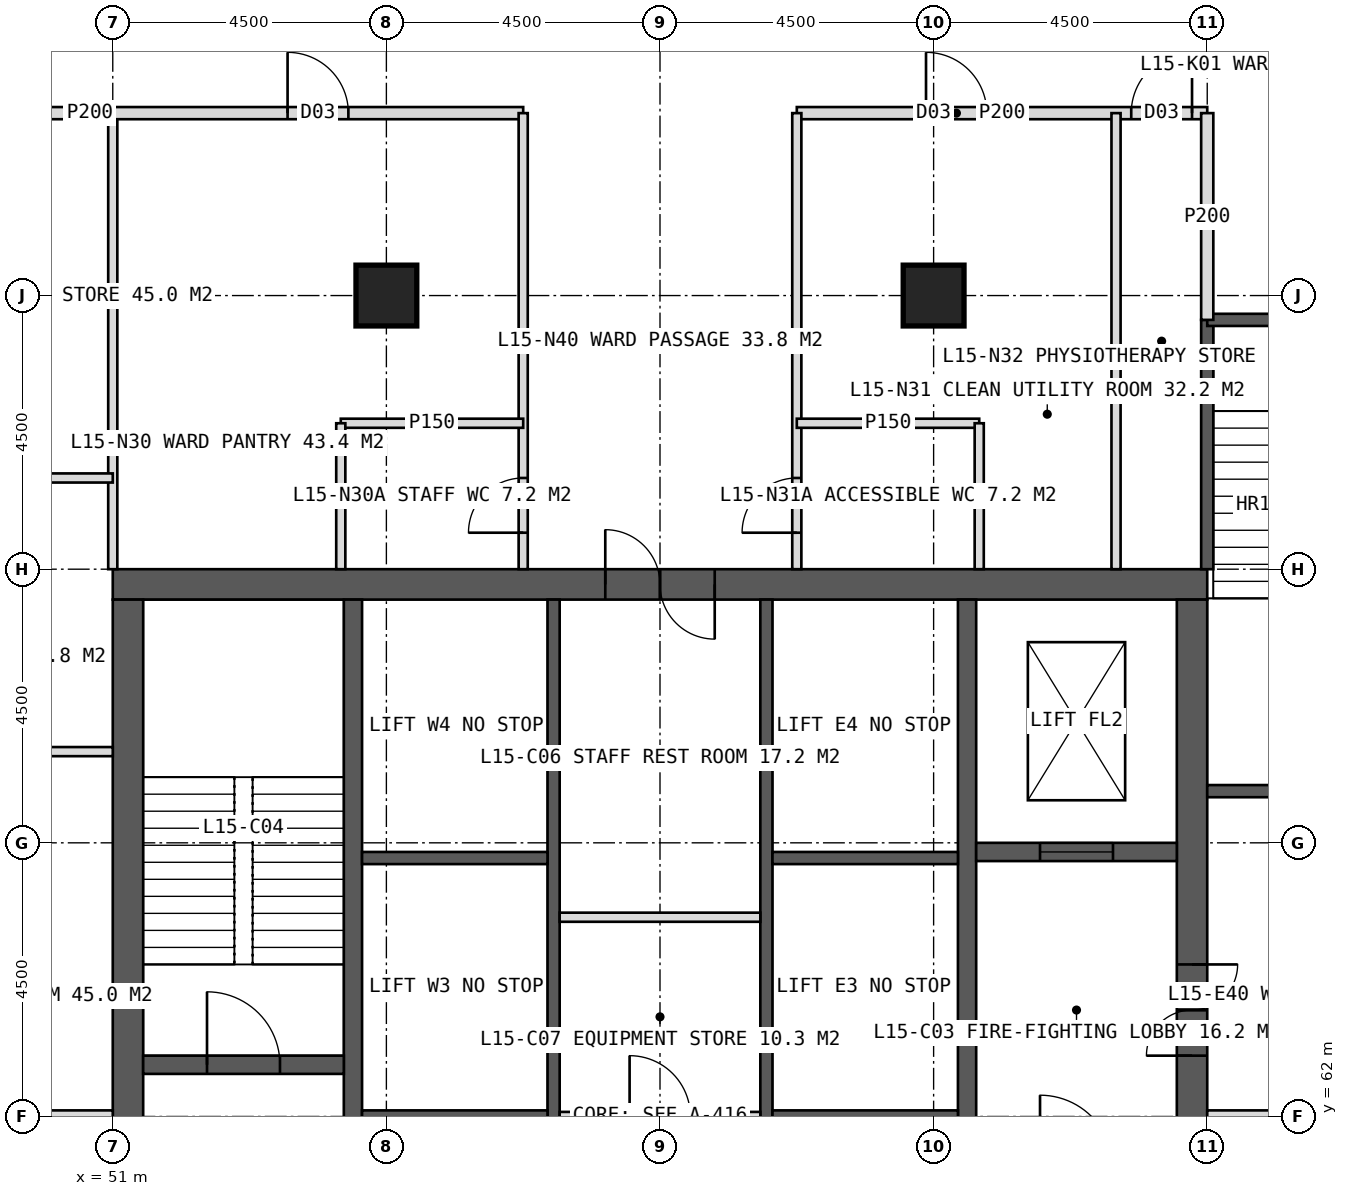
"""IFC4 building model, lengths in metres.
Left out: names, types, materials, properties, quantities, classifications, styles, units other than length and angle.
Written with IfcOpenShell. Run it as: python <this file> out.ifc"""

import sys

from ifc_helpers import new_model, si_unit, direction, frame, frame_2d, origin, origin_2d, place, context, subcontext, project, spatial, rectangle, hollow_rectangle, extrude, element, fill, save


model = new_model("IFC4")
c1 = context("Model", 3, precision=1e-05, world=origin(), true_north=direction((0.0, 1.0)))
c2 = subcontext(c1, "Body", "Model", "MODEL_VIEW")
j1 = project(units=[si_unit("LENGTHUNIT", "METRE"), si_unit("PLANEANGLEUNIT", "RADIAN")], contexts=[c1])
p1 = place(None, origin())
s1 = spatial("IfcSite", under=j1, at=p1, CompositionType="ELEMENT")
p2 = place(p1, origin())
s2 = spatial("IfcBuilding", under=s1, at=p2, CompositionType="ELEMENT")
p3 = place(p2, frame((0.0, 0.0, 67.0)))
s3 = spatial("IfcBuildingStorey", under=s2, at=p3, CompositionType="ELEMENT", Elevation=67.0)
p4 = place(p3, frame((51.0, 70.75, 0.0), z_axis=(0.0, 0.0, 1.0), x_axis=(1.0, 0.0, 0.0)))
e1 = element("IfcWall", 1, at=p4, inside=s3, PredefinedType="SHEAR", context=c2, shape_type="SweptSolid", body=[
    extrude(rectangle(XDim=18.0, YDim=0.5, at=frame_2d((9.0, 0.0))), origin(), (0.0, 0.0, 1.0), 4.0),
])
p5 = place(p4, frame((8.1, 0.0, 0.0)))
e2 = element("IfcOpeningElement", 2, at=p5, cuts=e1, PredefinedType="OPENING", context=c2, shape_type="SweptSolid", body=[
    extrude(rectangle(XDim=1.8, YDim=2.2, at=frame_2d((0.9, 1.1))), frame((0.0, 0.26, 0.0), z_axis=(0.0, -1.0, 0.0), x_axis=(1.0, 0.0, 0.0)), (0.0, 0.0, 1.0), 0.52),
])
p6 = place(p3, frame((51.25, 53.5, 0.0), z_axis=(0.0, 0.0, 1.0), x_axis=(0.0, 1.0, 0.0)))
e3 = element("IfcWall", 3, at=p6, inside=s3, PredefinedType="SHEAR", context=c2, shape_type="SweptSolid", body=[
    extrude(rectangle(XDim=17.0, YDim=0.5, at=frame_2d((8.5, 0.0))), origin(), (0.0, 0.0, 1.0), 4.0),
])
p7 = place(p6, frame((6.0, 0.0, 0.0)))
e4 = element("IfcOpeningElement", 4, at=p7, cuts=e3, PredefinedType="OPENING", context=c2, shape_type="SweptSolid", body=[
    extrude(rectangle(XDim=1.5, YDim=2.2, at=frame_2d((0.75, 1.1))), frame((0.0, 0.26, 0.0), z_axis=(0.0, -1.0, 0.0), x_axis=(1.0, 0.0, 0.0)), (0.0, 0.0, 1.0), 0.52),
])
p8 = place(p3, frame((68.75, 53.5, 0.0), z_axis=(0.0, 0.0, 1.0), x_axis=(0.0, 1.0, 0.0)))
e5 = element("IfcWall", 5, at=p8, inside=s3, PredefinedType="SHEAR", context=c2, shape_type="SweptSolid", body=[
    extrude(rectangle(XDim=17.0, YDim=0.5, at=frame_2d((8.5, 0.0))), origin(), (0.0, 0.0, 1.0), 4.0),
])
p9 = place(p8, frame((9.5, 0.0, 0.0)))
e6 = element("IfcOpeningElement", 6, at=p9, cuts=e5, PredefinedType="OPENING", context=c2, shape_type="SweptSolid", body=[
    extrude(rectangle(XDim=1.5, YDim=2.2, at=frame_2d((0.75, 1.1))), frame((0.0, 0.26, 0.0), z_axis=(0.0, -1.0, 0.0), x_axis=(1.0, 0.0, 0.0)), (0.0, 0.0, 1.0), 0.52),
])
for number, where, z_axis, x_axis in (
    (7, (54.95, 53.5, 0.0), (0.0, 0.0, 1.0), (0.0, 1.0, 0.0)),
    (8, (65.05, 53.5, 0.0), (0.0, 0.0, 1.0), (0.0, 1.0, 0.0)),
):
    element("IfcWall", number, at=place(p3, frame(where, z_axis=z_axis, x_axis=x_axis)), inside=s3, PredefinedType="SHEAR", context=c2, shape_type="SweptSolid", body=[
        extrude(rectangle(XDim=17.0, YDim=0.3, at=frame_2d((8.5, 0.0))), origin(), (0.0, 0.0, 1.0), 4.0),
    ])
p10 = place(p3, frame((58.25, 53.5, 0.0), z_axis=(0.0, 0.0, 1.0), x_axis=(0.0, 1.0, 0.0)))
e9 = element("IfcWall", 9, at=p10, inside=s3, PredefinedType="SHEAR", context=c2, shape_type="SweptSolid", body=[
    extrude(rectangle(XDim=17.0, YDim=0.2, at=frame_2d((8.5, 0.0))), origin(), (0.0, 0.0, 1.0), 4.0),
])
p11 = place(p10, frame((1.375, 0.0, 0.0)))
e10 = element("IfcOpeningElement", 10, at=p11, cuts=e9, PredefinedType="OPENING", context=c2, shape_type="SweptSolid", body=[
    extrude(rectangle(XDim=1.4, YDim=2.2, at=frame_2d((0.7, 1.1))), frame((0.0, 0.11, 0.0), z_axis=(0.0, -1.0, 0.0), x_axis=(1.0, 0.0, 0.0)), (0.0, 0.0, 1.0), 0.22),
])
p12 = place(p10, frame((5.675, 0.0, 0.0)))
e11 = element("IfcOpeningElement", 11, at=p12, cuts=e9, PredefinedType="OPENING", context=c2, shape_type="SweptSolid", body=[
    extrude(rectangle(XDim=1.4, YDim=2.2, at=frame_2d((0.7, 1.1))), frame((0.0, 0.11, 0.0), z_axis=(0.0, -1.0, 0.0), x_axis=(1.0, 0.0, 0.0)), (0.0, 0.0, 1.0), 0.22),
])
p13 = place(p3, frame((61.75, 53.5, 0.0), z_axis=(0.0, 0.0, 1.0), x_axis=(0.0, 1.0, 0.0)))
e12 = element("IfcWall", 12, at=p13, inside=s3, PredefinedType="SHEAR", context=c2, shape_type="SweptSolid", body=[
    extrude(rectangle(XDim=17.0, YDim=0.2, at=frame_2d((8.5, 0.0))), origin(), (0.0, 0.0, 1.0), 4.0),
])
p14 = place(p13, frame((1.375, 0.0, 0.0)))
e13 = element("IfcOpeningElement", 13, at=p14, cuts=e12, PredefinedType="OPENING", context=c2, shape_type="SweptSolid", body=[
    extrude(rectangle(XDim=1.4, YDim=2.2, at=frame_2d((0.7, 1.1))), frame((0.0, 0.11, 0.0), z_axis=(0.0, -1.0, 0.0), x_axis=(1.0, 0.0, 0.0)), (0.0, 0.0, 1.0), 0.22),
])
p15 = place(p13, frame((5.675, 0.0, 0.0)))
e14 = element("IfcOpeningElement", 14, at=p15, cuts=e12, PredefinedType="OPENING", context=c2, shape_type="SweptSolid", body=[
    extrude(rectangle(XDim=1.4, YDim=2.2, at=frame_2d((0.7, 1.1))), frame((0.0, 0.11, 0.0), z_axis=(0.0, -1.0, 0.0), x_axis=(1.0, 0.0, 0.0)), (0.0, 0.0, 1.0), 0.22),
])
for number, where, z_axis, x_axis in (
    (15, (55.1, 62.0, 0.0), (0.0, 0.0, 1.0), (1.0, 0.0, 0.0)),
    (16, (61.85, 62.0, 0.0), (0.0, 0.0, 1.0), (1.0, 0.0, 0.0)),
    (17, (55.1, 66.25, 0.0), (0.0, 0.0, 1.0), (1.0, 0.0, 0.0)),
    (18, (61.85, 66.25, 0.0), (0.0, 0.0, 1.0), (1.0, 0.0, 0.0)),
):
    element("IfcWall", number, at=place(p3, frame(where, z_axis=z_axis, x_axis=x_axis)), inside=s3, PredefinedType="SHEAR", context=c2, shape_type="SweptSolid", body=[
        extrude(rectangle(XDim=3.05, YDim=0.2, at=frame_2d((1.525, 0.0))), origin(), (0.0, 0.0, 1.0), 4.0),
    ])
p16 = place(p3, frame((51.5, 62.85, 0.0), z_axis=(0.0, 0.0, 1.0), x_axis=(1.0, 0.0, 0.0)))
e19 = element("IfcWall", 19, at=p16, inside=s3, PredefinedType="SHEAR", context=c2, shape_type="SweptSolid", body=[
    extrude(rectangle(XDim=3.3, YDim=0.3, at=frame_2d((1.65, 0.0))), origin(), (0.0, 0.0, 1.0), 4.0),
])
p17 = place(p16, frame((1.05, 0.0, 0.0)))
e20 = element("IfcOpeningElement", 20, at=p17, cuts=e19, PredefinedType="OPENING", context=c2, shape_type="SweptSolid", body=[
    extrude(rectangle(XDim=1.2, YDim=2.1, at=frame_2d((0.6, 1.05))), frame((0.0, 0.16, 0.0), z_axis=(0.0, -1.0, 0.0), x_axis=(1.0, 0.0, 0.0)), (0.0, 0.0, 1.0), 0.32),
])
p18 = place(p3, frame((65.2, 66.35, 0.0), z_axis=(0.0, 0.0, 1.0), x_axis=(1.0, 0.0, 0.0)))
e21 = element("IfcWall", 21, at=p18, inside=s3, PredefinedType="SHEAR", context=c2, shape_type="SweptSolid", body=[
    extrude(rectangle(XDim=3.3, YDim=0.3, at=frame_2d((1.65, 0.0))), origin(), (0.0, 0.0, 1.0), 4.0),
])
p19 = place(p18, frame((1.05, 0.0, 0.0)))
e22 = element("IfcOpeningElement", 22, at=p19, cuts=e21, PredefinedType="OPENING", context=c2, shape_type="SweptSolid", body=[
    extrude(rectangle(XDim=1.2, YDim=2.2, at=frame_2d((0.6, 1.1))), frame((0.0, 0.16, 0.0), z_axis=(0.0, -1.0, 0.0), x_axis=(1.0, 0.0, 0.0)), (0.0, 0.0, 1.0), 0.32),
])
for number, where, z_axis, x_axis in (
    (23, (55.5, 75.5, 0.0), (0.0, 0.0, 1.0), (1.0, 0.0, 0.0)),
    (24, (64.5, 75.5, 0.0), (0.0, 0.0, 1.0), (1.0, 0.0, 0.0)),
):
    element("IfcColumn", number, at=place(p3, frame(where, z_axis=z_axis, x_axis=x_axis)), inside=s3, PredefinedType="COLUMN", context=c2, shape_type="SweptSolid", body=[
        extrude(hollow_rectangle(XDim=1.0, YDim=1.0, WallThickness=0.1, at=origin_2d()), origin(), (0.0, 0.0, 1.0), 4.0),
    ])
p20 = place(p3, frame((51.0, 71.0, 0.0), z_axis=(0.0, 0.0, 1.0), x_axis=(0.0, 1.0, 0.0)))
e25 = element("IfcWall", 25, at=p20, inside=s3, PredefinedType="PARTITIONING", context=c2, shape_type="SweptSolid", body=[
    extrude(rectangle(XDim=7.5, YDim=0.15, at=frame_2d((3.75, 0.0))), origin(), (0.0, 0.0, 1.0), 3.75),
])
p21 = place(p3, frame((43.5, 78.5, 0.0), z_axis=(0.0, 0.0, 1.0), x_axis=(1.0, 0.0, 0.0)))
e26 = element("IfcWall", 26, at=p21, inside=s3, PredefinedType="PARTITIONING", context=c2, shape_type="SweptSolid", body=[
    extrude(rectangle(XDim=14.25, YDim=0.2, at=frame_2d((7.125, 0.0))), origin(), (0.0, 0.0, 1.0), 3.75),
])
p22 = place(p21, frame((10.375, 0.0, 0.0)))
e27 = element("IfcOpeningElement", 27, at=p22, cuts=e26, PredefinedType="OPENING", context=c2, shape_type="SweptSolid", body=[
    extrude(rectangle(XDim=1.0, YDim=2.1, at=frame_2d((0.5, 1.05))), frame((0.0, 0.11, 0.0), z_axis=(0.0, -1.0, 0.0), x_axis=(1.0, 0.0, 0.0)), (0.0, 0.0, 1.0), 0.22),
])
p23 = place(p3, frame((62.25, 78.5, 0.0), z_axis=(0.0, 0.0, 1.0), x_axis=(1.0, 0.0, 0.0)))
e28 = element("IfcWall", 28, at=p23, inside=s3, PredefinedType="PARTITIONING", context=c2, shape_type="SweptSolid", body=[
    extrude(rectangle(XDim=6.75, YDim=0.2, at=frame_2d((3.375, 0.0))), origin(), (0.0, 0.0, 1.0), 3.75),
])
p24 = place(p23, frame((2.125, 0.0, 0.0)))
e29 = element("IfcOpeningElement", 29, at=p24, cuts=e28, PredefinedType="OPENING", context=c2, shape_type="SweptSolid", body=[
    extrude(rectangle(XDim=1.0, YDim=2.1, at=frame_2d((0.5, 1.05))), frame((0.0, 0.11, 0.0), z_axis=(0.0, -1.0, 0.0), x_axis=(1.0, 0.0, 0.0)), (0.0, 0.0, 1.0), 0.22),
])
p25 = place(p23, frame((5.5, 0.0, 0.0)))
e30 = element("IfcOpeningElement", 30, at=p25, cuts=e28, PredefinedType="OPENING", context=c2, shape_type="SweptSolid", body=[
    extrude(rectangle(XDim=1.0, YDim=2.1, at=frame_2d((0.5, 1.05))), frame((0.0, 0.11, 0.0), z_axis=(0.0, -1.0, 0.0), x_axis=(1.0, 0.0, 0.0)), (0.0, 0.0, 1.0), 0.22),
])
p26 = place(p3, frame((57.75, 71.0, 0.0), z_axis=(0.0, 0.0, 1.0), x_axis=(0.0, 1.0, 0.0)))
e31 = element("IfcWall", 31, at=p26, inside=s3, PredefinedType="PARTITIONING", context=c2, shape_type="SweptSolid", body=[
    extrude(rectangle(XDim=7.5, YDim=0.15, at=frame_2d((3.75, 0.0))), origin(), (0.0, 0.0, 1.0), 3.75),
])
p27 = place(p26, frame((0.6, 0.0, 0.0)))
e32 = element("IfcOpeningElement", 32, at=p27, cuts=e31, PredefinedType="OPENING", context=c2, shape_type="SweptSolid", body=[
    extrude(rectangle(XDim=0.9, YDim=2.1, at=frame_2d((0.45, 1.05))), frame((0.0, 0.085, 0.0), z_axis=(0.0, -1.0, 0.0), x_axis=(1.0, 0.0, 0.0)), (0.0, 0.0, 1.0), 0.17),
])
p28 = place(p3, frame((62.25, 71.0, 0.0), z_axis=(0.0, 0.0, 1.0), x_axis=(0.0, 1.0, 0.0)))
e33 = element("IfcWall", 33, at=p28, inside=s3, PredefinedType="PARTITIONING", context=c2, shape_type="SweptSolid", body=[
    extrude(rectangle(XDim=7.5, YDim=0.15, at=frame_2d((3.75, 0.0))), origin(), (0.0, 0.0, 1.0), 3.75),
])
p29 = place(p28, frame((0.6, 0.0, 0.0)))
e34 = element("IfcOpeningElement", 34, at=p29, cuts=e33, PredefinedType="OPENING", context=c2, shape_type="SweptSolid", body=[
    extrude(rectangle(XDim=0.9, YDim=2.1, at=frame_2d((0.45, 1.05))), frame((0.0, 0.085, 0.0), z_axis=(0.0, -1.0, 0.0), x_axis=(1.0, 0.0, 0.0)), (0.0, 0.0, 1.0), 0.17),
])
p30 = place(p3, frame((67.5, 71.0, 0.0), z_axis=(0.0, 0.0, 1.0), x_axis=(0.0, 1.0, 0.0)))
e35 = element("IfcWall", 35, at=p30, inside=s3, PredefinedType="PARTITIONING", context=c2, shape_type="SweptSolid", body=[
    extrude(rectangle(XDim=7.5, YDim=0.15, at=frame_2d((3.75, 0.0))), origin(), (0.0, 0.0, 1.0), 3.75),
])
p31 = place(p3, frame((54.75, 73.4, 0.0), z_axis=(0.0, 0.0, 1.0), x_axis=(1.0, 0.0, 0.0)))
e36 = element("IfcWall", 36, at=p31, inside=s3, PredefinedType="PARTITIONING", context=c2, shape_type="SweptSolid", body=[
    extrude(rectangle(XDim=3.0, YDim=0.15, at=frame_2d((1.5, 0.0))), origin(), (0.0, 0.0, 1.0), 3.75),
])
p32 = place(p3, frame((54.75, 71.0, 0.0), z_axis=(0.0, 0.0, 1.0), x_axis=(0.0, 1.0, 0.0)))
e37 = element("IfcWall", 37, at=p32, inside=s3, PredefinedType="PARTITIONING", context=c2, shape_type="SweptSolid", body=[
    extrude(rectangle(XDim=2.4, YDim=0.15, at=frame_2d((1.2, 0.0))), origin(), (0.0, 0.0, 1.0), 3.75),
])
p33 = place(p3, frame((62.25, 73.4, 0.0), z_axis=(0.0, 0.0, 1.0), x_axis=(1.0, 0.0, 0.0)))
e38 = element("IfcWall", 38, at=p33, inside=s3, PredefinedType="PARTITIONING", context=c2, shape_type="SweptSolid", body=[
    extrude(rectangle(XDim=3.0, YDim=0.15, at=frame_2d((1.5, 0.0))), origin(), (0.0, 0.0, 1.0), 3.75),
])
p34 = place(p3, frame((65.25, 71.0, 0.0), z_axis=(0.0, 0.0, 1.0), x_axis=(0.0, 1.0, 0.0)))
e39 = element("IfcWall", 39, at=p34, inside=s3, PredefinedType="PARTITIONING", context=c2, shape_type="SweptSolid", body=[
    extrude(rectangle(XDim=2.4, YDim=0.15, at=frame_2d((1.2, 0.0))), origin(), (0.0, 0.0, 1.0), 3.75),
])
p35 = place(p3, frame((51.0, 62.0, 0.0), z_axis=(0.0, 0.0, 1.0), x_axis=(-1.0, 0.0, 0.0)))
e40 = element("IfcWall", 40, at=p35, inside=s3, PredefinedType="SOLIDWALL", context=c2, shape_type="SweptSolid", body=[
    extrude(rectangle(XDim=7.5, YDim=0.2, at=frame_2d((3.75, 0.0))), origin(), (0.0, 0.0, 1.0), 2.75),
])
for number, where, z_axis, x_axis in (
    (41, (51.0, 68.0, 0.0), (0.0, 0.0, 1.0), (-1.0, 0.0, 0.0)),
    (42, (51.0, 72.5, 0.0), (0.0, 0.0, 1.0), (-1.0, 0.0, 0.0)),
):
    element("IfcWall", number, at=place(p3, frame(where, z_axis=z_axis, x_axis=x_axis)), inside=s3, PredefinedType="PARTITIONING", context=c2, shape_type="SweptSolid", body=[
        extrude(rectangle(XDim=7.5, YDim=0.15, at=frame_2d((3.75, 0.0))), origin(), (0.0, 0.0, 1.0), 3.75),
    ])
p36 = place(p3, frame((69.0, 62.0, 0.0), z_axis=(0.0, 0.0, 1.0), x_axis=(1.0, 0.0, 0.0)))
e43 = element("IfcWall", 43, at=p36, inside=s3, PredefinedType="SOLIDWALL", context=c2, shape_type="SweptSolid", body=[
    extrude(rectangle(XDim=7.5, YDim=0.2, at=frame_2d((3.75, 0.0))), origin(), (0.0, 0.0, 1.0), 2.75),
])
p37 = place(p3, frame((58.35, 62.0, 0.0), z_axis=(0.0, 0.0, 1.0), x_axis=(1.0, 0.0, 0.0)))
e44 = element("IfcWall", 44, at=p37, inside=s3, PredefinedType="PARTITIONING", context=c2, shape_type="SweptSolid", body=[
    extrude(rectangle(XDim=3.3, YDim=0.15, at=frame_2d((1.65, 0.0))), origin(), (0.0, 0.0, 1.0), 3.75),
])
p38 = place(p37, frame((1.15, 0.0, 0.0)))
e45 = element("IfcOpeningElement", 45, at=p38, cuts=e44, PredefinedType="OPENING", context=c2, shape_type="SweptSolid", body=[
    extrude(rectangle(XDim=1.0, YDim=2.1, at=frame_2d((0.5, 1.05))), frame((0.0, 0.085, 0.0), z_axis=(0.0, -1.0, 0.0), x_axis=(1.0, 0.0, 0.0)), (0.0, 0.0, 1.0), 0.17),
])
p39 = place(p3, frame((58.35, 65.277, 0.0), z_axis=(0.0, 0.0, 1.0), x_axis=(1.0, 0.0, 0.0)))
e46 = element("IfcWall", 46, at=p39, inside=s3, PredefinedType="PARTITIONING", context=c2, shape_type="SweptSolid", body=[
    extrude(rectangle(XDim=3.3, YDim=0.15, at=frame_2d((1.65, 0.0))), origin(), (0.0, 0.0, 1.0), 3.75),
])
p40 = place(p3, frame((69.0, 71.0, 0.0), z_axis=(0.0, 0.0, 1.0), x_axis=(0.0, 1.0, 0.0)))
e47 = element("IfcWall", 47, at=p40, inside=s3, PredefinedType="SOLIDWALL", context=c2, shape_type="SweptSolid", body=[
    extrude(rectangle(XDim=4.1, YDim=0.2, at=frame_2d((2.05, 0.0))), origin(), (0.0, 0.0, 1.0), 3.75),
])
p41 = place(p3, frame((69.0, 67.35, 0.0), z_axis=(0.0, 0.0, 1.0), x_axis=(1.0, 0.0, 0.0)))
e48 = element("IfcWall", 48, at=p41, inside=s3, PredefinedType="SOLIDWALL", context=c2, shape_type="SweptSolid", body=[
    extrude(rectangle(XDim=3.5, YDim=0.2, at=frame_2d((1.75, 0.0))), origin(), (0.0, 0.0, 1.0), 3.75),
])
p42 = place(p3, frame((69.0, 75.1, 0.0), z_axis=(0.0, 0.0, 1.0), x_axis=(1.0, 0.0, 0.0)))
e49 = element("IfcWall", 49, at=p42, inside=s3, PredefinedType="SOLIDWALL", context=c2, shape_type="SweptSolid", body=[
    extrude(rectangle(XDim=3.5, YDim=0.2, at=frame_2d((1.75, 0.0))), origin(), (0.0, 0.0, 1.0), 3.75),
])
p43 = place(p42, frame((1.15, 0.0, 0.0)))
e50 = element("IfcOpeningElement", 50, at=p43, cuts=e49, PredefinedType="OPENING", context=c2, shape_type="SweptSolid", body=[
    extrude(rectangle(XDim=1.2, YDim=2.1, at=frame_2d((0.6, 1.05))), frame((0.0, 0.11, 0.0), z_axis=(0.0, -1.0, 0.0), x_axis=(1.0, 0.0, 0.0)), (0.0, 0.0, 1.0), 0.22),
])
p44 = place(p3, frame((69.0, 75.1, 0.0), z_axis=(0.0, 0.0, 1.0), x_axis=(0.0, 1.0, 0.0)))
e51 = element("IfcWall", 51, at=p44, inside=s3, PredefinedType="PARTITIONING", context=c2, shape_type="SweptSolid", body=[
    extrude(rectangle(XDim=3.4, YDim=0.2, at=frame_2d((1.7, 0.0))), origin(), (0.0, 0.0, 1.0), 3.75),
])
p45 = place(p27, origin())
e52 = element("IfcDoor", 52, at=p45, inside=s3, OperationType="SINGLE_SWING_LEFT", PredefinedType="DOOR", context=c2, shape_type="SweptSolid", body=[
    extrude(rectangle(XDim=0.9, YDim=2.1, at=frame_2d((0.45, 1.05))), frame((0.0, 0.025, 0.0), z_axis=(0.0, -1.0, 0.0), x_axis=(1.0, 0.0, 0.0)), (0.0, 0.0, 1.0), 0.05),
])
fill(e32, e52)
p46 = place(p22, origin())
e53 = element("IfcDoor", 53, at=p46, inside=s3, OperationType="SINGLE_SWING_LEFT", PredefinedType="DOOR", context=c2, shape_type="SweptSolid", body=[
    extrude(rectangle(XDim=1.0, YDim=2.1, at=frame_2d((0.5, 1.05))), frame((0.0, 0.025, 0.0), z_axis=(0.0, -1.0, 0.0), x_axis=(1.0, 0.0, 0.0)), (0.0, 0.0, 1.0), 0.05),
])
fill(e27, e53)
p47 = place(p29, origin())
e54 = element("IfcDoor", 54, at=p47, inside=s3, OperationType="SINGLE_SWING_LEFT", PredefinedType="DOOR", context=c2, shape_type="SweptSolid", body=[
    extrude(rectangle(XDim=0.9, YDim=2.1, at=frame_2d((0.45, 1.05))), frame((0.0, 0.025, 0.0), z_axis=(0.0, -1.0, 0.0), x_axis=(1.0, 0.0, 0.0)), (0.0, 0.0, 1.0), 0.05),
])
fill(e34, e54)
p48 = place(p24, origin())
e55 = element("IfcDoor", 55, at=p48, inside=s3, OperationType="SINGLE_SWING_LEFT", PredefinedType="DOOR", context=c2, shape_type="SweptSolid", body=[
    extrude(rectangle(XDim=1.0, YDim=2.1, at=frame_2d((0.5, 1.05))), frame((0.0, 0.025, 0.0), z_axis=(0.0, -1.0, 0.0), x_axis=(1.0, 0.0, 0.0)), (0.0, 0.0, 1.0), 0.05),
])
fill(e29, e55)
p49 = place(p25, origin())
e56 = element("IfcDoor", 56, at=p49, inside=s3, OperationType="SINGLE_SWING_RIGHT", PredefinedType="DOOR", context=c2, shape_type="SweptSolid", body=[
    extrude(rectangle(XDim=1.0, YDim=2.1, at=frame_2d((0.5, 1.05))), frame((0.0, 0.025, 0.0), z_axis=(0.0, -1.0, 0.0), x_axis=(1.0, 0.0, 0.0)), (0.0, 0.0, 1.0), 0.05),
])
fill(e30, e56)
p50 = place(p9, origin())
e57 = element("IfcDoor", 57, at=p50, inside=s3, OperationType="DOUBLE_DOOR_SINGLE_SWING", PredefinedType="DOOR", context=c2, shape_type="SweptSolid", body=[
    extrude(rectangle(XDim=1.5, YDim=2.2, at=frame_2d((0.75, 1.1))), frame((0.0, 0.025, 0.0), z_axis=(0.0, -1.0, 0.0), x_axis=(1.0, 0.0, 0.0)), (0.0, 0.0, 1.0), 0.05),
])
fill(e6, e57)
p51 = place(p17, origin())
e58 = element("IfcDoor", 58, at=p51, inside=s3, OperationType="SINGLE_SWING_LEFT", PredefinedType="DOOR", context=c2, shape_type="SweptSolid", body=[
    extrude(rectangle(XDim=1.2, YDim=2.1, at=frame_2d((0.6, 1.05))), frame((0.0, 0.025, 0.0), z_axis=(0.0, -1.0, 0.0), x_axis=(1.0, 0.0, 0.0)), (0.0, 0.0, 1.0), 0.05),
])
fill(e20, e58)
p52 = place(p19, origin())
e59 = element("IfcDoor", 59, at=p52, inside=s3, OperationType="SLIDING_TO_LEFT", PredefinedType="DOOR", context=c2, shape_type="SweptSolid", body=[
    extrude(rectangle(XDim=1.2, YDim=2.2, at=frame_2d((0.6, 1.1))), frame((0.0, 0.025, 0.0), z_axis=(0.0, -1.0, 0.0), x_axis=(1.0, 0.0, 0.0)), (0.0, 0.0, 1.0), 0.05),
])
fill(e22, e59)
p53 = place(p38, origin())
e60 = element("IfcDoor", 60, at=p53, inside=s3, OperationType="SINGLE_SWING_LEFT", PredefinedType="DOOR", context=c2, shape_type="SweptSolid", body=[
    extrude(rectangle(XDim=1.0, YDim=2.1, at=frame_2d((0.5, 1.05))), frame((0.0, 0.025, 0.0), z_axis=(0.0, -1.0, 0.0), x_axis=(1.0, 0.0, 0.0)), (0.0, 0.0, 1.0), 0.05),
])
fill(e45, e60)
p54 = place(p5, origin())
e61 = element("IfcDoor", 61, at=p54, inside=s3, OperationType="DOUBLE_DOOR_SINGLE_SWING", PredefinedType="DOOR", context=c2, shape_type="SweptSolid", body=[
    extrude(rectangle(XDim=1.8, YDim=2.2, at=frame_2d((0.9, 1.1))), frame((0.0, 0.025, 0.0), z_axis=(0.0, -1.0, 0.0), x_axis=(1.0, 0.0, 0.0)), (0.0, 0.0, 1.0), 0.05),
])
fill(e2, e61)
save(model, sys.argv[1])
